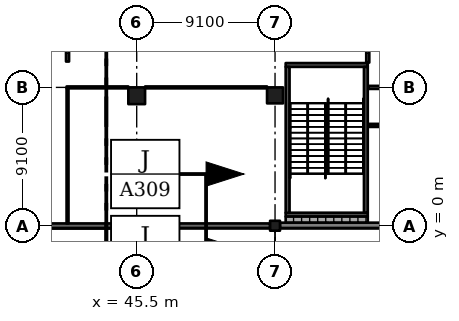
"""IFC4 building model, lengths in metres.
Left out: names, types, materials, properties, quantities, classifications, styles, units other than length and angle.
Written with IfcOpenShell. Run it as: python <this file> out.ifc"""

import sys

from ifc_helpers import new_model, si_unit, direction, frame, frame_2d, origin, origin_2d, place, context, subcontext, project, spatial, rectangle, extrude, element, fill, save


model = new_model("IFC4")
c1 = context("Model", 3, precision=1e-05, world=origin(), true_north=direction((0.0, 1.0)))
c2 = subcontext(c1, "Body", "Model", "MODEL_VIEW")
j1 = project(units=[si_unit("LENGTHUNIT", "METRE"), si_unit("PLANEANGLEUNIT", "RADIAN")], contexts=[c1])
p1 = place(None, origin())
s1 = spatial("IfcSite", under=j1, at=p1, CompositionType="ELEMENT")
p2 = place(p1, origin())
s2 = spatial("IfcBuilding", under=s1, at=p2, CompositionType="ELEMENT")
p3 = place(p2, origin())
s3 = spatial("IfcBuildingStorey", under=s2, at=p3, CompositionType="ELEMENT", Elevation=0.0)
p4 = place(p3, frame((45.5, 0.0, -0.4), z_axis=(0.0, 0.0, 1.0), x_axis=(1.0, 0.0, 0.0)))
e1 = element("IfcColumn", 1, at=p4, inside=s3, PredefinedType="COLUMN", context=c2, shape_type="SweptSolid", body=[
    extrude(rectangle(XDim=0.7, YDim=0.7, at=origin_2d()), origin(), (0.0, 0.0, 1.0), 6.77),
])
p5 = place(p3, frame((45.5, 8.55, -0.4), z_axis=(0.0, 0.0, 1.0), x_axis=(1.0, 0.0, 0.0)))
e2 = element("IfcColumn", 2, at=p5, inside=s3, PredefinedType="COLUMN", context=c2, shape_type="SweptSolid", body=[
    extrude(rectangle(XDim=1.1, YDim=1.1, at=origin_2d()), origin(), (0.0, 0.0, 1.0), 6.77),
])
p6 = place(p3, frame((54.6, 0.0, -0.4), z_axis=(0.0, 0.0, 1.0), x_axis=(1.0, 0.0, 0.0)))
e3 = element("IfcColumn", 3, at=p6, inside=s3, PredefinedType="COLUMN", context=c2, shape_type="SweptSolid", body=[
    extrude(rectangle(XDim=0.65, YDim=0.65, at=origin_2d()), origin(), (0.0, 0.0, 1.0), 6.77),
])
p7 = place(p3, frame((54.6, 8.575, -0.4), z_axis=(0.0, 0.0, 1.0), x_axis=(1.0, 0.0, 0.0)))
e4 = element("IfcColumn", 4, at=p7, inside=s3, PredefinedType="COLUMN", context=c2, shape_type="SweptSolid", body=[
    extrude(rectangle(XDim=1.05, YDim=1.05, at=origin_2d()), origin(), (0.0, 0.0, 1.0), 6.77),
])
p8 = place(p3, frame((60.7, 0.725, -0.4), z_axis=(0.0, 0.0, 1.0), x_axis=(-1.0, 0.0, 0.0)))
e5 = element("IfcWall", 5, at=p8, inside=s3, PredefinedType="SHEAR", context=c2, shape_type="SweptSolid", body=[
    extrude(rectangle(XDim=5.4, YDim=0.25, at=frame_2d((2.7, 0.0))), origin(), (0.0, 0.0, 1.0), 6.77),
])
p9 = place(p3, frame((60.7, 10.575, -0.4), z_axis=(0.0, 0.0, 1.0), x_axis=(-1.0, 0.0, 0.0)))
e6 = element("IfcWall", 6, at=p9, inside=s3, PredefinedType="SHEAR", context=c2, shape_type="SweptSolid", body=[
    extrude(rectangle(XDim=5.4, YDim=0.25, at=frame_2d((2.7, 0.0))), origin(), (0.0, 0.0, 1.0), 6.77),
])
p10 = place(p9, frame((1.5, 0.0, 0.4)))
e7 = element("IfcOpeningElement", 7, at=p10, cuts=e6, PredefinedType="OPENING", context=c2, shape_type="SweptSolid", body=[
    extrude(rectangle(XDim=2.4, YDim=2.1, at=frame_2d((1.2, 1.05))), frame((0.0, 0.135, 0.0), z_axis=(0.0, -1.0, 0.0), x_axis=(1.0, 0.0, 0.0)), (0.0, 0.0, 1.0), 0.27),
])
for number, where, z_axis, x_axis in (
    (8, (55.425, 10.45, -0.4), (0.0, 0.0, 1.0), (0.0, -1.0, 0.0)),
    (9, (60.575, 10.45, -0.4), (0.0, 0.0, 1.0), (0.0, -1.0, 0.0)),
):
    element("IfcWall", number, at=place(p3, frame(where, z_axis=z_axis, x_axis=x_axis)), inside=s3, PredefinedType="SHEAR", context=c2, shape_type="SweptSolid", body=[
        extrude(rectangle(XDim=9.6, YDim=0.25, at=frame_2d((4.8, 0.0))), origin(), (0.0, 0.0, 1.0), 6.77),
    ])
p11 = place(p3, frame((36.775, 0.0, 0.0), z_axis=(0.0, 0.0, 1.0), x_axis=(1.0, 0.0, 0.0)))
e10 = element("IfcWall", 10, at=p11, inside=s3, PredefinedType="SOLIDWALL", context=c2, shape_type="SweptSolid", body=[
    extrude(rectangle(XDim=8.375, YDim=0.3, at=frame_2d((4.188, 0.0))), origin(), (0.0, 0.0, 1.0), 5.32),
])
p12 = place(p11, frame((0.7, 0.0, 0.0)))
e11 = element("IfcOpeningElement", 11, at=p12, cuts=e10, PredefinedType="OPENING", context=c2, shape_type="SweptSolid", body=[
    extrude(rectangle(XDim=3.0, YDim=2.4, at=frame_2d((1.5, 1.2))), frame((0.0, 0.16, 0.0), z_axis=(0.0, -1.0, 0.0), x_axis=(1.0, 0.0, 0.0)), (0.0, 0.0, 1.0), 0.32),
])
p13 = place(p3, frame((45.85, 0.0, 0.0), z_axis=(0.0, 0.0, 1.0), x_axis=(1.0, 0.0, 0.0)))
e12 = element("IfcWall", 12, at=p13, inside=s3, PredefinedType="SOLIDWALL", context=c2, shape_type="SweptSolid", body=[
    extrude(rectangle(XDim=8.425, YDim=0.3, at=frame_2d((4.212, 0.0))), origin(), (0.0, 0.0, 1.0), 5.27),
])
p14 = place(p3, frame((54.925, 0.025, 0.0), z_axis=(0.0, 0.0, 1.0), x_axis=(1.0, 0.0, 0.0)))
e13 = element("IfcWall", 13, at=p14, inside=s3, PredefinedType="SOLIDWALL", context=c2, shape_type="SweptSolid", body=[
    extrude(rectangle(XDim=8.425, YDim=0.35, at=frame_2d((4.212, 0.0))), origin(), (0.0, 0.0, 1.0), 5.27),
])
p15 = place(p3, frame((55.3, 0.4, 0.0), z_axis=(0.0, 0.0, 1.0), x_axis=(1.0, 0.0, 0.0)))
e14 = element("IfcWall", 14, at=p15, inside=s3, PredefinedType="SOLIDWALL", context=c2, shape_type="SweptSolid", body=[
    extrude(rectangle(XDim=5.4, YDim=0.4, at=frame_2d((2.7, 0.0))), origin(), (0.0, 0.0, 1.0), 6.02),
])
p16 = place(p3, frame((40.95, 9.038, 0.0), z_axis=(0.0, 0.0, 1.0), x_axis=(0.0, -1.0, 0.0)))
e15 = element("IfcWall", 15, at=p16, inside=s3, PredefinedType="PARTITIONING", context=c2, shape_type="SweptSolid", body=[
    extrude(rectangle(XDim=8.888, YDim=0.125, at=frame_2d((4.444, 0.0))), origin(), (0.0, 0.0, 1.0), 6.02),
])
p17 = place(p3, frame((40.95, 18.1, 0.0), z_axis=(0.0, 0.0, 1.0), x_axis=(0.0, -1.0, 0.0)))
e16 = element("IfcWall", 16, at=p17, inside=s3, PredefinedType="PARTITIONING", context=c2, shape_type="SweptSolid", body=[
    extrude(rectangle(XDim=7.3, YDim=0.2, at=frame_2d((3.65, 0.0))), origin(), (0.0, 0.0, 1.0), 6.02),
])
p18 = place(p17, frame((0.95, 0.0, 0.0)))
e17 = element("IfcOpeningElement", 17, at=p18, cuts=e16, PredefinedType="OPENING", context=c2, shape_type="SweptSolid", body=[
    extrude(rectangle(XDim=1.8, YDim=2.4, at=frame_2d((0.9, 1.2))), frame((0.0, 0.11, 0.0), z_axis=(0.0, -1.0, 0.0), x_axis=(1.0, 0.0, 0.0)), (0.0, 0.0, 1.0), 0.22),
])
p19 = place(p17, frame((4.55, 0.0, 0.0)))
e18 = element("IfcOpeningElement", 18, at=p19, cuts=e16, PredefinedType="OPENING", context=c2, shape_type="SweptSolid", body=[
    extrude(rectangle(XDim=1.8, YDim=2.4, at=frame_2d((0.9, 1.2))), frame((0.0, 0.11, 0.0), z_axis=(0.0, -1.0, 0.0), x_axis=(1.0, 0.0, 0.0)), (0.0, 0.0, 1.0), 0.22),
])
p20 = place(p3, frame((44.95, 9.1, 0.0), z_axis=(0.0, 0.0, 1.0), x_axis=(-1.0, 0.0, 0.0)))
e19 = element("IfcWall", 19, at=p20, inside=s3, PredefinedType="PARTITIONING", context=c2, shape_type="SweptSolid", body=[
    extrude(rectangle(XDim=4.062, YDim=0.125, at=frame_2d((2.031, 0.0))), origin(), (0.0, 0.0, 1.0), 5.32),
])
p21 = place(p3, frame((54.075, 9.1, 0.0), z_axis=(0.0, 0.0, 1.0), x_axis=(-1.0, 0.0, 0.0)))
e20 = element("IfcWall", 20, at=p21, inside=s3, PredefinedType="PARTITIONING", context=c2, shape_type="SweptSolid", body=[
    extrude(rectangle(XDim=8.025, YDim=0.125, at=frame_2d((4.012, 0.0))), origin(), (0.0, 0.0, 1.0), 5.32),
])
p22 = place(p21, frame((3.55, 0.0, 0.0)))
e21 = element("IfcOpeningElement", 21, at=p22, cuts=e20, PredefinedType="OPENING", context=c2, shape_type="SweptSolid", body=[
    extrude(rectangle(XDim=0.9, YDim=2.1, at=frame_2d((0.45, 1.05))), frame((0.0, 0.073, 0.0), z_axis=(0.0, -1.0, 0.0), x_axis=(1.0, 0.0, 0.0)), (0.0, 0.0, 1.0), 0.145),
])
p23 = place(p3, frame((60.7, 18.1, 0.0), z_axis=(0.0, 0.0, 1.0), x_axis=(0.0, -1.0, 0.0)))
e22 = element("IfcWall", 22, at=p23, inside=s3, PredefinedType="PARTITIONING", context=c2, shape_type="SweptSolid", body=[
    extrude(rectangle(XDim=7.37, YDim=0.2, at=frame_2d((3.685, 0.0))), origin(), (0.0, 0.0, 1.0), 6.02),
])
p24 = place(p23, frame((2.15, 0.0, 0.0)))
e23 = element("IfcOpeningElement", 23, at=p24, cuts=e22, PredefinedType="OPENING", context=c2, shape_type="SweptSolid", body=[
    extrude(rectangle(XDim=3.0, YDim=2.4, at=frame_2d((1.5, 1.2))), frame((0.0, 0.11, 0.0), z_axis=(0.0, -1.0, 0.0), x_axis=(1.0, 0.0, 0.0)), (0.0, 0.0, 1.0), 0.22),
])
p25 = place(p3, frame((63.25, 9.1, 0.0), z_axis=(0.0, 0.0, 1.0), x_axis=(-1.0, 0.0, 0.0)))
e24 = element("IfcWall", 24, at=p25, inside=s3, PredefinedType="PARTITIONING", context=c2, shape_type="SweptSolid", body=[
    extrude(rectangle(XDim=2.52, YDim=0.2, at=frame_2d((1.26, 0.0))), origin(), (0.0, 0.0, 1.0), 5.57),
])
p26 = place(p3, frame((82.57, 6.6, 0.0), z_axis=(0.0, 0.0, 1.0), x_axis=(-1.0, 0.0, 0.0)))
e25 = element("IfcWall", 25, at=p26, inside=s3, PredefinedType="PARTITIONING", context=c2, shape_type="SweptSolid", body=[
    extrude(rectangle(XDim=21.84, YDim=0.2, at=frame_2d((10.92, 0.0))), origin(), (0.0, 0.0, 1.0), 6.02),
])
p27 = place(p26, frame((0.65, 0.0, 0.0)))
e26 = element("IfcOpeningElement", 26, at=p27, cuts=e25, PredefinedType="OPENING", context=c2, shape_type="SweptSolid", body=[
    extrude(rectangle(XDim=1.8, YDim=2.4, at=frame_2d((0.9, 1.2))), frame((0.0, 0.11, 0.0), z_axis=(0.0, -1.0, 0.0), x_axis=(1.0, 0.0, 0.0)), (0.0, 0.0, 1.0), 0.22),
])
p28 = place(p26, frame((3.75, 0.0, 0.0)))
e27 = element("IfcOpeningElement", 27, at=p28, cuts=e25, PredefinedType="OPENING", context=c2, shape_type="SweptSolid", body=[
    extrude(rectangle(XDim=1.8, YDim=2.4, at=frame_2d((0.9, 1.2))), frame((0.0, 0.11, 0.0), z_axis=(0.0, -1.0, 0.0), x_axis=(1.0, 0.0, 0.0)), (0.0, 0.0, 1.0), 0.22),
])
p29 = place(p26, frame((6.95, 0.0, 0.0)))
e28 = element("IfcOpeningElement", 28, at=p29, cuts=e25, PredefinedType="OPENING", context=c2, shape_type="SweptSolid", body=[
    extrude(rectangle(XDim=1.8, YDim=2.4, at=frame_2d((0.9, 1.2))), frame((0.0, 0.11, 0.0), z_axis=(0.0, -1.0, 0.0), x_axis=(1.0, 0.0, 0.0)), (0.0, 0.0, 1.0), 0.22),
])
p30 = place(p26, frame((10.05, 0.0, 0.0)))
e29 = element("IfcOpeningElement", 29, at=p30, cuts=e25, PredefinedType="OPENING", context=c2, shape_type="SweptSolid", body=[
    extrude(rectangle(XDim=1.8, YDim=2.4, at=frame_2d((0.9, 1.2))), frame((0.0, 0.11, 0.0), z_axis=(0.0, -1.0, 0.0), x_axis=(1.0, 0.0, 0.0)), (0.0, 0.0, 1.0), 0.22),
])
p31 = place(p26, frame((13.15, 0.0, 0.0)))
e30 = element("IfcOpeningElement", 30, at=p31, cuts=e25, PredefinedType="OPENING", context=c2, shape_type="SweptSolid", body=[
    extrude(rectangle(XDim=1.8, YDim=2.4, at=frame_2d((0.9, 1.2))), frame((0.0, 0.11, 0.0), z_axis=(0.0, -1.0, 0.0), x_axis=(1.0, 0.0, 0.0)), (0.0, 0.0, 1.0), 0.22),
])
p32 = place(p26, frame((16.25, 0.0, 0.0)))
e31 = element("IfcOpeningElement", 31, at=p32, cuts=e25, PredefinedType="OPENING", context=c2, shape_type="SweptSolid", body=[
    extrude(rectangle(XDim=1.8, YDim=2.4, at=frame_2d((0.9, 1.2))), frame((0.0, 0.11, 0.0), z_axis=(0.0, -1.0, 0.0), x_axis=(1.0, 0.0, 0.0)), (0.0, 0.0, 1.0), 0.22),
])
p33 = place(p26, frame((19.35, 0.0, 0.0)))
e32 = element("IfcOpeningElement", 32, at=p33, cuts=e25, PredefinedType="OPENING", context=c2, shape_type="SweptSolid", body=[
    extrude(rectangle(XDim=1.8, YDim=2.4, at=frame_2d((0.9, 1.2))), frame((0.0, 0.11, 0.0), z_axis=(0.0, -1.0, 0.0), x_axis=(1.0, 0.0, 0.0)), (0.0, 0.0, 1.0), 0.22),
])
p34 = place(p12, frame((3.0, 0.0, 0.0), z_axis=(0.0, 0.0, 1.0), x_axis=(-1.0, 0.0, 0.0)))
e33 = element("IfcDoor", 33, at=p34, inside=s3, OperationType="DOUBLE_DOOR_SINGLE_SWING", PredefinedType="DOOR", context=c2, shape_type="SweptSolid", body=[
    extrude(rectangle(XDim=3.0, YDim=2.4, at=frame_2d((1.5, 1.2))), frame((0.0, 0.025, 0.0), z_axis=(0.0, -1.0, 0.0), x_axis=(1.0, 0.0, 0.0)), (0.0, 0.0, 1.0), 0.05),
])
fill(e11, e33)
p35 = place(p22, origin())
e34 = element("IfcDoor", 34, at=p35, inside=s3, OperationType="SINGLE_SWING_RIGHT", PredefinedType="DOOR", context=c2, shape_type="SweptSolid", body=[
    extrude(rectangle(XDim=0.9, YDim=2.1, at=frame_2d((0.45, 1.05))), frame((0.0, 0.025, 0.0), z_axis=(0.0, -1.0, 0.0), x_axis=(1.0, 0.0, 0.0)), (0.0, 0.0, 1.0), 0.05),
])
fill(e21, e34)
p36 = place(p33, origin())
e35 = element("IfcDoor", 35, at=p36, inside=s3, OperationType="DOUBLE_DOOR_SINGLE_SWING", PredefinedType="DOOR", context=c2, shape_type="SweptSolid", body=[
    extrude(rectangle(XDim=1.8, YDim=2.4, at=frame_2d((0.9, 1.2))), frame((0.0, 0.025, 0.0), z_axis=(0.0, -1.0, 0.0), x_axis=(1.0, 0.0, 0.0)), (0.0, 0.0, 1.0), 0.05),
])
fill(e32, e35)
p37 = place(p10, origin())
e36 = element("IfcDoor", 36, at=p37, inside=s3, OperationType="DOUBLE_DOOR_SINGLE_SWING", PredefinedType="DOOR", context=c2, shape_type="SweptSolid", body=[
    extrude(rectangle(XDim=2.4, YDim=2.1, at=frame_2d((1.2, 1.05))), frame((0.0, 0.025, 0.0), z_axis=(0.0, -1.0, 0.0), x_axis=(1.0, 0.0, 0.0)), (0.0, 0.0, 1.0), 0.05),
])
fill(e7, e36)
save(model, sys.argv[1])
